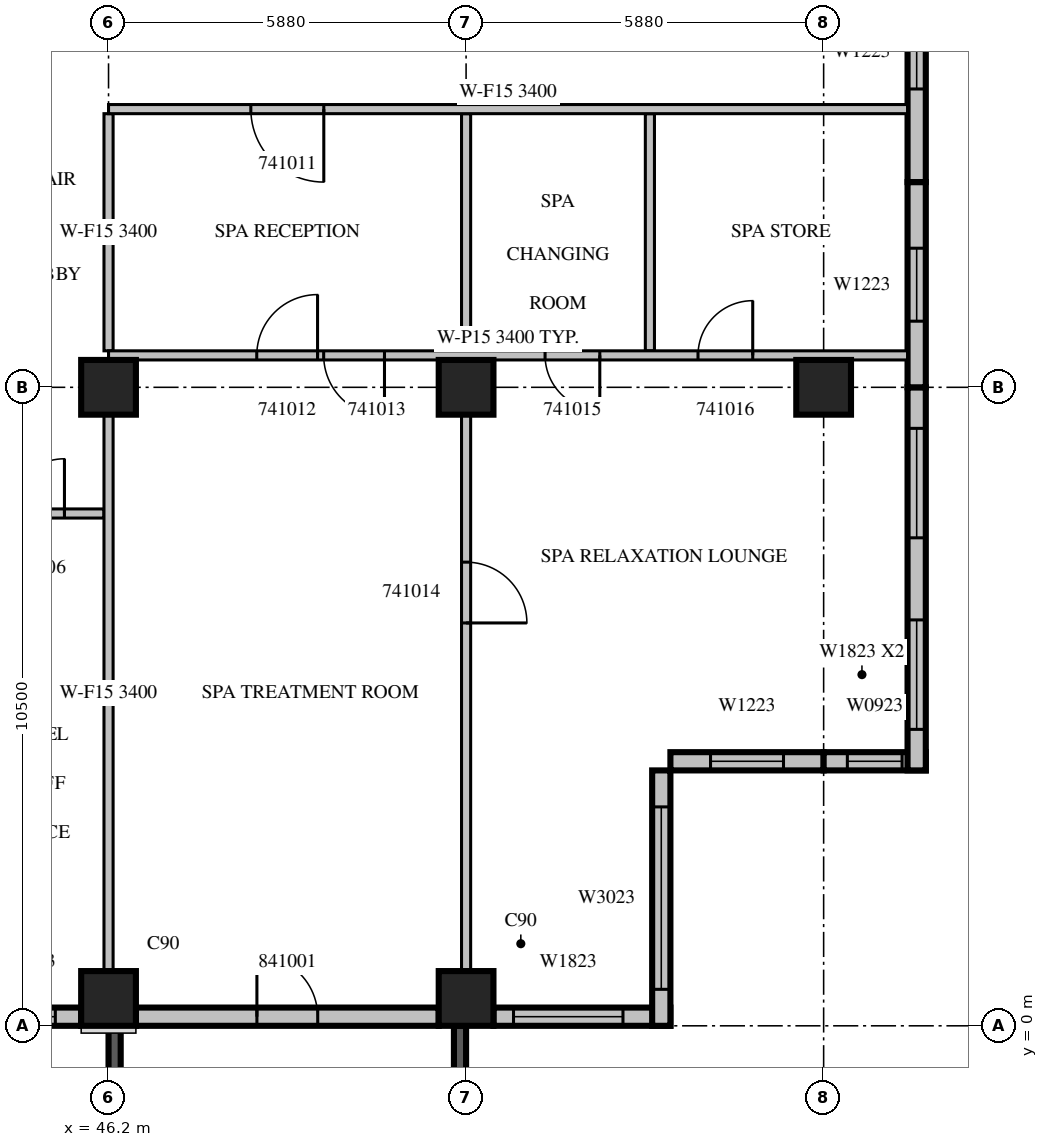
"""IFC4 building model, lengths in metres.
Left out: names, types, materials, properties, quantities, classifications, styles, units other than length and angle.
Written with IfcOpenShell. Run it as: python <this file> out.ifc"""

import sys

from ifc_helpers import new_model, si_unit, direction, frame, frame_2d, origin, origin_2d, place, context, subcontext, project, spatial, rectangle, extrude, source, transform, mapped, element, fill, save


model = new_model("IFC4")
c1 = context("Model", 3, precision=1e-05, world=origin(), true_north=direction((0.0, 1.0)))
c2 = subcontext(c1, "Body", "Model", "MODEL_VIEW")
j1 = project(units=[si_unit("LENGTHUNIT", "METRE"), si_unit("PLANEANGLEUNIT", "RADIAN")], contexts=[c1])
p1 = place(None, origin())
s1 = spatial("IfcSite", under=j1, at=p1, CompositionType="ELEMENT")
p2 = place(p1, origin())
s2 = spatial("IfcBuilding", under=s1, at=p2, CompositionType="ELEMENT")
p3 = place(p2, frame((0.0, 0.0, 189.2)))
s3 = spatial("IfcBuildingStorey", under=s2, at=p3, CompositionType="ELEMENT", Elevation=189.2)
m1 = source(origin(), c2, "Body", "SweptSolid", [
    extrude(rectangle(XDim=0.9, YDim=0.9, at=origin_2d()), origin(), (0.0, 0.0, 1.0), 3.8),
])
for number, where, z_axis, x_axis in (
    (1, (46.2, 0.45, 0.0), (0.0, 0.0, 1.0), (1.0, 0.0, 0.0)),
    (2, (52.08, 0.45, 0.0), (0.0, 0.0, 1.0), (1.0, 0.0, 0.0)),
    (3, (46.2, 10.5, 0.0), (0.0, 0.0, 1.0), (1.0, 0.0, 0.0)),
    (4, (52.08, 10.5, 0.0), (0.0, 0.0, 1.0), (1.0, 0.0, 0.0)),
    (5, (57.96, 10.5, 0.0), (0.0, 0.0, 1.0), (1.0, 0.0, 0.0)),
):
    element("IfcColumn", number, at=place(p3, frame(where, z_axis=z_axis, x_axis=x_axis)), inside=s3, PredefinedType="COLUMN", context=c2, shape_type="MappedRepresentation", body=[
        mapped(m1, transform((0.0, 0.0, 0.0), scale=1.0)),
    ])
m2 = source(origin(), c2, "Body", "SweptSolid", [
    extrude(rectangle(XDim=1.75, YDim=0.3, at=frame_2d((0.875, 0.0))), origin(), (0.0, 0.0, 1.0), 3.4),
])
p4 = place(p3, frame((44.0, 0.15, 0.0), z_axis=(0.0, 0.0, 1.0), x_axis=(1.0, 0.0, 0.0)))
e6 = element("IfcWall", 6, at=p4, inside=s3, PredefinedType="STANDARD", context=c2, shape_type="MappedRepresentation", body=[
    mapped(m2, transform((0.0, 0.0, 0.0), scale=1.0)),
])
m3 = source(origin(), c2, "Body", "SweptSolid", [
    extrude(rectangle(XDim=0.9, YDim=2.3, at=frame_2d((0.45, 1.15))), frame((0.0, 0.16, 0.0), z_axis=(0.0, -1.0, 0.0), x_axis=(1.0, 0.0, 0.0)), (0.0, 0.0, 1.0), 0.32),
])
p5 = place(p4, frame((0.425, 0.0, 0.6)))
e7 = element("IfcOpeningElement", 7, at=p5, cuts=e6, PredefinedType="OPENING", context=c2, shape_type="MappedRepresentation", body=[
    mapped(m3, transform((0.0, 0.0, 0.0), scale=1.0)),
])
m4 = source(origin(), c2, "Body", "SweptSolid", [
    extrude(rectangle(XDim=4.98, YDim=0.3, at=frame_2d((2.49, 0.0))), origin(), (0.0, 0.0, 1.0), 3.4),
])
p6 = place(p3, frame((46.65, 0.15, 0.0), z_axis=(0.0, 0.0, 1.0), x_axis=(1.0, 0.0, 0.0)))
e8 = element("IfcWall", 8, at=p6, inside=s3, PredefinedType="STANDARD", context=c2, shape_type="MappedRepresentation", body=[
    mapped(m4, transform((0.0, 0.0, 0.0), scale=1.0)),
])
m5 = source(origin(), c2, "Body", "SweptSolid", [
    extrude(rectangle(XDim=1.0, YDim=2.1, at=frame_2d((0.5, 1.05))), frame((0.0, 0.16, 0.0), z_axis=(0.0, -1.0, 0.0), x_axis=(1.0, 0.0, 0.0)), (0.0, 0.0, 1.0), 0.32),
])
p7 = place(p6, frame((1.99, 0.0, 0.0)))
e9 = element("IfcOpeningElement", 9, at=p7, cuts=e8, PredefinedType="OPENING", context=c2, shape_type="MappedRepresentation", body=[
    mapped(m5, transform((0.0, 0.0, 0.0), scale=1.0)),
])
m6 = source(origin(), c2, "Body", "SweptSolid", [
    extrude(rectangle(XDim=2.91, YDim=0.3, at=frame_2d((1.455, 0.0))), origin(), (0.0, 0.0, 1.0), 3.4),
])
p8 = place(p3, frame((52.53, 0.15, 0.0), z_axis=(0.0, 0.0, 1.0), x_axis=(1.0, 0.0, 0.0)))
e10 = element("IfcWall", 10, at=p8, inside=s3, PredefinedType="STANDARD", context=c2, shape_type="MappedRepresentation", body=[
    mapped(m6, transform((0.0, 0.0, 0.0), scale=1.0)),
])
m7 = source(origin(), c2, "Body", "SweptSolid", [
    extrude(rectangle(XDim=1.8, YDim=2.3, at=frame_2d((0.9, 1.15))), frame((0.0, 0.16, 0.0), z_axis=(0.0, -1.0, 0.0), x_axis=(1.0, 0.0, 0.0)), (0.0, 0.0, 1.0), 0.32),
])
p9 = place(p8, frame((0.33, 0.0, 0.6)))
e11 = element("IfcOpeningElement", 11, at=p9, cuts=e10, PredefinedType="OPENING", context=c2, shape_type="MappedRepresentation", body=[
    mapped(m7, transform((0.0, 0.0, 0.0), scale=1.0)),
])
m8 = source(origin(), c2, "Body", "SweptSolid", [
    extrude(rectangle(XDim=4.2, YDim=0.3, at=frame_2d((2.1, 0.0))), origin(), (0.0, 0.0, 1.0), 3.4),
])
p10 = place(p3, frame((55.29, 0.0, 0.0), z_axis=(0.0, 0.0, 1.0), x_axis=(0.0, 1.0, 0.0)))
e12 = element("IfcWall", 12, at=p10, inside=s3, PredefinedType="STANDARD", context=c2, shape_type="MappedRepresentation", body=[
    mapped(m8, transform((0.0, 0.0, 0.0), scale=1.0)),
])
m9 = source(origin(), c2, "Body", "SweptSolid", [
    extrude(rectangle(XDim=3.0, YDim=2.3, at=frame_2d((1.5, 1.15))), frame((0.0, 0.16, 0.0), z_axis=(0.0, -1.0, 0.0), x_axis=(1.0, 0.0, 0.0)), (0.0, 0.0, 1.0), 0.32),
])
p11 = place(p10, frame((0.6, 0.0, 0.6)))
e13 = element("IfcOpeningElement", 13, at=p11, cuts=e12, PredefinedType="OPENING", context=c2, shape_type="MappedRepresentation", body=[
    mapped(m9, transform((0.0, 0.0, 0.0), scale=1.0)),
])
m10 = source(origin(), c2, "Body", "SweptSolid", [
    extrude(rectangle(XDim=2.52, YDim=0.3, at=frame_2d((1.26, 0.0))), origin(), (0.0, 0.0, 1.0), 3.4),
])
p12 = place(p3, frame((55.44, 4.35, 0.0), z_axis=(0.0, 0.0, 1.0), x_axis=(1.0, 0.0, 0.0)))
e14 = element("IfcWall", 14, at=p12, inside=s3, PredefinedType="STANDARD", context=c2, shape_type="MappedRepresentation", body=[
    mapped(m10, transform((0.0, 0.0, 0.0), scale=1.0)),
])
m11 = source(origin(), c2, "Body", "SweptSolid", [
    extrude(rectangle(XDim=1.2, YDim=2.3, at=frame_2d((0.6, 1.15))), frame((0.0, 0.16, 0.0), z_axis=(0.0, -1.0, 0.0), x_axis=(1.0, 0.0, 0.0)), (0.0, 0.0, 1.0), 0.32),
])
p13 = place(p12, frame((0.66, 0.0, 0.6)))
e15 = element("IfcOpeningElement", 15, at=p13, cuts=e14, PredefinedType="OPENING", context=c2, shape_type="MappedRepresentation", body=[
    mapped(m11, transform((0.0, 0.0, 0.0), scale=1.0)),
])
m12 = source(origin(), c2, "Body", "SweptSolid", [
    extrude(rectangle(XDim=1.68, YDim=0.3, at=frame_2d((0.84, 0.0))), origin(), (0.0, 0.0, 1.0), 3.4),
])
p14 = place(p3, frame((57.96, 4.35, 0.0), z_axis=(0.0, 0.0, 1.0), x_axis=(1.0, 0.0, 0.0)))
e16 = element("IfcWall", 16, at=p14, inside=s3, PredefinedType="STANDARD", context=c2, shape_type="MappedRepresentation", body=[
    mapped(m12, transform((0.0, 0.0, 0.0), scale=1.0)),
])
p15 = place(p14, frame((0.39, 0.0, 0.6)))
e17 = element("IfcOpeningElement", 17, at=p15, cuts=e16, PredefinedType="OPENING", context=c2, shape_type="MappedRepresentation", body=[
    mapped(m3, transform((0.0, 0.0, 0.0), scale=1.0)),
])
m13 = source(origin(), c2, "Body", "SweptSolid", [
    extrude(rectangle(XDim=6.3, YDim=0.3, at=frame_2d((3.15, 0.0))), origin(), (0.0, 0.0, 1.0), 3.4),
])
p16 = place(p3, frame((59.49, 4.2, 0.0), z_axis=(0.0, 0.0, 1.0), x_axis=(0.0, 1.0, 0.0)))
e18 = element("IfcWall", 18, at=p16, inside=s3, PredefinedType="STANDARD", context=c2, shape_type="MappedRepresentation", body=[
    mapped(m13, transform((0.0, 0.0, 0.0), scale=1.0)),
])
p17 = place(p16, frame((0.675, 0.0, 0.6)))
e19 = element("IfcOpeningElement", 19, at=p17, cuts=e18, PredefinedType="OPENING", context=c2, shape_type="MappedRepresentation", body=[
    mapped(m7, transform((0.0, 0.0, 0.0), scale=1.0)),
])
p18 = place(p16, frame((3.825, 0.0, 0.6)))
e20 = element("IfcOpeningElement", 20, at=p18, cuts=e18, PredefinedType="OPENING", context=c2, shape_type="MappedRepresentation", body=[
    mapped(m7, transform((0.0, 0.0, 0.0), scale=1.0)),
])
m14 = source(origin(), c2, "Body", "SweptSolid", [
    extrude(rectangle(XDim=3.375, YDim=0.3, at=frame_2d((1.688, 0.0))), origin(), (0.0, 0.0, 1.0), 3.4),
])
p19 = place(p3, frame((59.49, 10.5, 0.0), z_axis=(0.0, 0.0, 1.0), x_axis=(0.0, 1.0, 0.0)))
e21 = element("IfcWall", 21, at=p19, inside=s3, PredefinedType="STANDARD", context=c2, shape_type="MappedRepresentation", body=[
    mapped(m14, transform((0.0, 0.0, 0.0), scale=1.0)),
])
p20 = place(p19, frame((1.087, 0.0, 0.6)))
e22 = element("IfcOpeningElement", 22, at=p20, cuts=e21, PredefinedType="OPENING", context=c2, shape_type="MappedRepresentation", body=[
    mapped(m11, transform((0.0, 0.0, 0.0), scale=1.0)),
])
p21 = place(p3, frame((59.49, 13.875, 0.0), z_axis=(0.0, 0.0, 1.0), x_axis=(0.0, 1.0, 0.0)))
e23 = element("IfcWall", 23, at=p21, inside=s3, PredefinedType="STANDARD", context=c2, shape_type="MappedRepresentation", body=[
    mapped(m14, transform((0.0, 0.0, 0.0), scale=1.0)),
])
p22 = place(p21, frame((1.531, 0.0, 0.6)))
e24 = element("IfcOpeningElement", 24, at=p22, cuts=e23, PredefinedType="OPENING", context=c2, shape_type="MappedRepresentation", body=[
    mapped(m11, transform((0.0, 0.0, 0.0), scale=1.0)),
])
m15 = source(origin(), c2, "Body", "SweptSolid", [
    extrude(rectangle(XDim=3.9, YDim=0.2, at=frame_2d((1.95, 0.0))), origin(), (0.0, 0.0, 1.0), 3.39),
])
p23 = place(p3, frame((46.3, 0.0, 0.0), z_axis=(0.0, 0.0, 1.0), x_axis=(0.0, -1.0, 0.0)))
e25 = element("IfcWall", 25, at=p23, inside=s3, PredefinedType="SOLIDWALL", context=c2, shape_type="MappedRepresentation", body=[
    mapped(m15, transform((0.0, 0.0, 0.0), scale=1.0)),
])
m16 = source(origin(), c2, "Body", "SweptSolid", [
    extrude(rectangle(XDim=2.4, YDim=2.3, at=frame_2d((1.2, 1.15))), frame((0.0, 0.11, 0.0), z_axis=(0.0, -1.0, 0.0), x_axis=(1.0, 0.0, 0.0)), (0.0, 0.0, 1.0), 0.22),
])
p24 = place(p23, frame((0.75, 0.0, 0.6)))
e26 = element("IfcOpeningElement", 26, at=p24, cuts=e25, PredefinedType="OPENING", context=c2, shape_type="MappedRepresentation", body=[
    mapped(m16, transform((0.0, 0.0, 0.0), scale=1.0)),
])
p25 = place(p3, frame((51.98, 0.0, 0.0), z_axis=(0.0, 0.0, 1.0), x_axis=(0.0, -1.0, 0.0)))
e27 = element("IfcWall", 27, at=p25, inside=s3, PredefinedType="SOLIDWALL", context=c2, shape_type="MappedRepresentation", body=[
    mapped(m15, transform((0.0, 0.0, 0.0), scale=1.0)),
])
p26 = place(p25, frame((0.75, 0.0, 0.6)))
e28 = element("IfcOpeningElement", 28, at=p26, cuts=e27, PredefinedType="OPENING", context=c2, shape_type="MappedRepresentation", body=[
    mapped(m16, transform((0.0, 0.0, 0.0), scale=1.0)),
])
m17 = source(origin(), c2, "Body", "SweptSolid", [
    extrude(rectangle(XDim=2.2, YDim=0.15, at=frame_2d((1.1, 0.0))), origin(), (0.0, 0.0, 1.0), 3.4),
])
p27 = place(p3, frame((46.125, 8.425, 0.0), z_axis=(0.0, 0.0, 1.0), x_axis=(-1.0, 0.0, 0.0)))
e29 = element("IfcWall", 29, at=p27, inside=s3, PredefinedType="PARTITIONING", context=c2, shape_type="MappedRepresentation", body=[
    mapped(m17, transform((0.0, 0.0, 0.0), scale=1.0)),
])
m18 = source(origin(), c2, "Body", "SweptSolid", [
    extrude(rectangle(XDim=0.9, YDim=2.1, at=frame_2d((0.45, 1.05))), frame((0.0, 0.085, 0.0), z_axis=(0.0, -1.0, 0.0), x_axis=(1.0, 0.0, 0.0)), (0.0, 0.0, 1.0), 0.17),
])
p28 = place(p27, frame((0.65, 0.0, 0.0)))
e30 = element("IfcOpeningElement", 30, at=p28, cuts=e29, PredefinedType="OPENING", context=c2, shape_type="MappedRepresentation", body=[
    mapped(m18, transform((0.0, 0.0, 0.0), scale=1.0)),
])
m19 = source(origin(), c2, "Body", "SweptSolid", [
    extrude(rectangle(XDim=9.152, YDim=0.15, at=frame_2d((4.576, 0.0))), origin(), (0.0, 0.0, 1.0), 3.4),
])
p29 = place(p3, frame((52.08, 0.899, 0.0), z_axis=(0.0, 0.0, 1.0), x_axis=(0.0, 1.0, 0.0)))
e31 = element("IfcWall", 31, at=p29, inside=s3, PredefinedType="PARTITIONING", context=c2, shape_type="MappedRepresentation", body=[
    mapped(m19, transform((0.0, 0.0, 0.0), scale=1.0)),
])
m20 = source(origin(), c2, "Body", "SweptSolid", [
    extrude(rectangle(XDim=1.0, YDim=2.1, at=frame_2d((0.5, 1.05))), frame((0.0, 0.085, 0.0), z_axis=(0.0, -1.0, 0.0), x_axis=(1.0, 0.0, 0.0)), (0.0, 0.0, 1.0), 0.17),
])
p30 = place(p29, frame((5.726, 0.0, 0.0)))
e32 = element("IfcOpeningElement", 32, at=p30, cuts=e31, PredefinedType="OPENING", context=c2, shape_type="MappedRepresentation", body=[
    mapped(m20, transform((0.0, 0.0, 0.0), scale=1.0)),
])
m21 = source(origin(), c2, "Body", "SweptSolid", [
    extrude(rectangle(XDim=3.9, YDim=0.15, at=frame_2d((1.95, 0.0))), origin(), (0.0, 0.0, 1.0), 3.4),
])
for number, where, z_axis, x_axis in (
    (33, (52.08, 11.1, 0.0), (0.0, 0.0, 1.0), (0.0, 1.0, 0.0)),
    (34, (55.103, 11.1, 0.0), (0.0, 0.0, 1.0), (0.0, 1.0, 0.0)),
):
    element("IfcWall", number, at=place(p3, frame(where, z_axis=z_axis, x_axis=x_axis)), inside=s3, PredefinedType="PARTITIONING", context=c2, shape_type="MappedRepresentation", body=[
        mapped(m21, transform((0.0, 0.0, 0.0), scale=1.0)),
    ])
p31 = place(p3, frame((46.2, 0.899, 0.0), z_axis=(0.0, 0.0, 1.0), x_axis=(0.0, 1.0, 0.0)))
e35 = element("IfcWall", 35, at=p31, inside=s3, PredefinedType="PARTITIONING", context=c2, shape_type="MappedRepresentation", body=[
    mapped(m19, transform((0.0, 0.0, 0.0), scale=1.0)),
])
p32 = place(p3, frame((46.2, 11.1, 0.0), z_axis=(0.0, 0.0, 1.0), x_axis=(0.0, 1.0, 0.0)))
e36 = element("IfcWall", 36, at=p32, inside=s3, PredefinedType="PARTITIONING", context=c2, shape_type="MappedRepresentation", body=[
    mapped(m21, transform((0.0, 0.0, 0.0), scale=1.0)),
])
m22 = source(origin(), c2, "Body", "SweptSolid", [
    extrude(rectangle(XDim=13.14, YDim=0.15, at=frame_2d((6.57, 0.0))), origin(), (0.0, 0.0, 1.0), 3.4),
])
p33 = place(p3, frame((59.34, 11.025, 0.0), z_axis=(0.0, 0.0, 1.0), x_axis=(-1.0, 0.0, 0.0)))
e37 = element("IfcWall", 37, at=p33, inside=s3, PredefinedType="PARTITIONING", context=c2, shape_type="MappedRepresentation", body=[
    mapped(m22, transform((0.0, 0.0, 0.0), scale=1.0)),
])
p34 = place(p33, frame((9.703, 0.0, 0.0)))
e38 = element("IfcOpeningElement", 38, at=p34, cuts=e37, PredefinedType="OPENING", context=c2, shape_type="MappedRepresentation", body=[
    mapped(m20, transform((0.0, 0.0, 0.0), scale=1.0)),
])
p35 = place(p33, frame((8.602, 0.0, 0.0)))
e39 = element("IfcOpeningElement", 39, at=p35, cuts=e37, PredefinedType="OPENING", context=c2, shape_type="MappedRepresentation", body=[
    mapped(m20, transform((0.0, 0.0, 0.0), scale=1.0)),
])
p36 = place(p33, frame((5.061, 0.0, 0.0)))
e40 = element("IfcOpeningElement", 40, at=p36, cuts=e37, PredefinedType="OPENING", context=c2, shape_type="MappedRepresentation", body=[
    mapped(m18, transform((0.0, 0.0, 0.0), scale=1.0)),
])
p37 = place(p33, frame((2.546, 0.0, 0.0)))
e41 = element("IfcOpeningElement", 41, at=p37, cuts=e37, PredefinedType="OPENING", context=c2, shape_type="MappedRepresentation", body=[
    mapped(m18, transform((0.0, 0.0, 0.0), scale=1.0)),
])
p38 = place(p3, frame((59.34, 15.075, 0.0), z_axis=(0.0, 0.0, 1.0), x_axis=(-1.0, 0.0, 0.0)))
e42 = element("IfcWall", 42, at=p38, inside=s3, PredefinedType="PARTITIONING", context=c2, shape_type="MappedRepresentation", body=[
    mapped(m22, transform((0.0, 0.0, 0.0), scale=1.0)),
])
m23 = source(origin(), c2, "Body", "SweptSolid", [
    extrude(rectangle(XDim=1.2, YDim=2.1, at=frame_2d((0.6, 1.05))), frame((0.0, 0.085, 0.0), z_axis=(0.0, -1.0, 0.0), x_axis=(1.0, 0.0, 0.0)), (0.0, 0.0, 1.0), 0.17),
])
p39 = place(p38, frame((9.6, 0.0, 0.0)))
e43 = element("IfcOpeningElement", 43, at=p39, cuts=e42, PredefinedType="OPENING", context=c2, shape_type="MappedRepresentation", body=[
    mapped(m23, transform((0.0, 0.0, 0.0), scale=1.0)),
])
m24 = source(origin(), c2, "Body", "SweptSolid", [
    extrude(rectangle(XDim=0.9, YDim=2.3, at=frame_2d((0.45, 1.15))), frame((0.0, 0.03, 0.0), z_axis=(0.0, -1.0, 0.0), x_axis=(1.0, 0.0, 0.0)), (0.0, 0.0, 1.0), 0.06),
])
p40 = place(p5, origin())
e44 = element("IfcWindow", 44, at=p40, inside=s3, PartitioningType="SINGLE_PANEL", PredefinedType="WINDOW", context=c2, shape_type="MappedRepresentation", body=[
    mapped(m24, transform((0.0, 0.0, 0.0), scale=1.0)),
])
fill(e7, e44)
m25 = source(origin(), c2, "Body", "SweptSolid", [
    extrude(rectangle(XDim=1.8, YDim=2.3, at=frame_2d((0.9, 1.15))), frame((0.0, 0.03, 0.0), z_axis=(0.0, -1.0, 0.0), x_axis=(1.0, 0.0, 0.0)), (0.0, 0.0, 1.0), 0.06),
])
p41 = place(p9, origin())
e45 = element("IfcWindow", 45, at=p41, inside=s3, PartitioningType="SINGLE_PANEL", PredefinedType="WINDOW", context=c2, shape_type="MappedRepresentation", body=[
    mapped(m25, transform((0.0, 0.0, 0.0), scale=1.0)),
])
fill(e11, e45)
m26 = source(origin(), c2, "Body", "SweptSolid", [
    extrude(rectangle(XDim=3.0, YDim=2.3, at=frame_2d((1.5, 1.15))), frame((0.0, 0.03, 0.0), z_axis=(0.0, -1.0, 0.0), x_axis=(1.0, 0.0, 0.0)), (0.0, 0.0, 1.0), 0.06),
])
p42 = place(p11, origin())
e46 = element("IfcWindow", 46, at=p42, inside=s3, PartitioningType="SINGLE_PANEL", PredefinedType="WINDOW", context=c2, shape_type="MappedRepresentation", body=[
    mapped(m26, transform((0.0, 0.0, 0.0), scale=1.0)),
])
fill(e13, e46)
m27 = source(origin(), c2, "Body", "SweptSolid", [
    extrude(rectangle(XDim=1.2, YDim=2.3, at=frame_2d((0.6, 1.15))), frame((0.0, 0.03, 0.0), z_axis=(0.0, -1.0, 0.0), x_axis=(1.0, 0.0, 0.0)), (0.0, 0.0, 1.0), 0.06),
])
p43 = place(p13, origin())
e47 = element("IfcWindow", 47, at=p43, inside=s3, PartitioningType="SINGLE_PANEL", PredefinedType="WINDOW", context=c2, shape_type="MappedRepresentation", body=[
    mapped(m27, transform((0.0, 0.0, 0.0), scale=1.0)),
])
fill(e15, e47)
p44 = place(p15, origin())
e48 = element("IfcWindow", 48, at=p44, inside=s3, PartitioningType="SINGLE_PANEL", PredefinedType="WINDOW", context=c2, shape_type="MappedRepresentation", body=[
    mapped(m24, transform((0.0, 0.0, 0.0), scale=1.0)),
])
fill(e17, e48)
p45 = place(p17, origin())
e49 = element("IfcWindow", 49, at=p45, inside=s3, PartitioningType="SINGLE_PANEL", PredefinedType="WINDOW", context=c2, shape_type="MappedRepresentation", body=[
    mapped(m25, transform((0.0, 0.0, 0.0), scale=1.0)),
])
fill(e19, e49)
p46 = place(p18, origin())
e50 = element("IfcWindow", 50, at=p46, inside=s3, PartitioningType="SINGLE_PANEL", PredefinedType="WINDOW", context=c2, shape_type="MappedRepresentation", body=[
    mapped(m25, transform((0.0, 0.0, 0.0), scale=1.0)),
])
fill(e20, e50)
p47 = place(p20, origin())
e51 = element("IfcWindow", 51, at=p47, inside=s3, PartitioningType="SINGLE_PANEL", PredefinedType="WINDOW", context=c2, shape_type="MappedRepresentation", body=[
    mapped(m27, transform((0.0, 0.0, 0.0), scale=1.0)),
])
fill(e22, e51)
p48 = place(p22, origin())
e52 = element("IfcWindow", 52, at=p48, inside=s3, PartitioningType="SINGLE_PANEL", PredefinedType="WINDOW", context=c2, shape_type="MappedRepresentation", body=[
    mapped(m27, transform((0.0, 0.0, 0.0), scale=1.0)),
])
fill(e24, e52)
m28 = source(origin(), c2, "Body", "SweptSolid", [
    extrude(rectangle(XDim=0.9, YDim=2.1, at=frame_2d((0.45, 1.05))), frame((0.0, 0.025, 0.0), z_axis=(0.0, -1.0, 0.0), x_axis=(1.0, 0.0, 0.0)), (0.0, 0.0, 1.0), 0.05),
])
p49 = place(p28, origin())
e53 = element("IfcDoor", 53, at=p49, inside=s3, OperationType="SINGLE_SWING_RIGHT", PredefinedType="DOOR", context=c2, shape_type="MappedRepresentation", body=[
    mapped(m28, transform((0.0, 0.0, 0.0), scale=1.0)),
])
fill(e30, e53)
m29 = source(origin(), c2, "Body", "SweptSolid", [
    extrude(rectangle(XDim=1.2, YDim=2.1, at=frame_2d((0.6, 1.05))), frame((0.0, 0.025, 0.0), z_axis=(0.0, -1.0, 0.0), x_axis=(1.0, 0.0, 0.0)), (0.0, 0.0, 1.0), 0.05),
])
p50 = place(p39, origin())
e54 = element("IfcDoor", 54, at=p50, inside=s3, OperationType="SINGLE_SWING_LEFT", PredefinedType="DOOR", context=c2, shape_type="MappedRepresentation", body=[
    mapped(m29, transform((0.0, 0.0, 0.0), scale=1.0)),
])
fill(e43, e54)
m30 = source(origin(), c2, "Body", "SweptSolid", [
    extrude(rectangle(XDim=1.0, YDim=2.1, at=frame_2d((0.5, 1.05))), frame((0.0, 0.025, 0.0), z_axis=(0.0, -1.0, 0.0), x_axis=(1.0, 0.0, 0.0)), (0.0, 0.0, 1.0), 0.05),
])
p51 = place(p34, origin())
e55 = element("IfcDoor", 55, at=p51, inside=s3, OperationType="SINGLE_SWING_RIGHT", PredefinedType="DOOR", context=c2, shape_type="MappedRepresentation", body=[
    mapped(m30, transform((0.0, 0.0, 0.0), scale=1.0)),
])
fill(e38, e55)
p52 = place(p35, origin())
e56 = element("IfcDoor", 56, at=p52, inside=s3, OperationType="SINGLE_SWING_LEFT", PredefinedType="DOOR", context=c2, shape_type="MappedRepresentation", body=[
    mapped(m30, transform((0.0, 0.0, 0.0), scale=1.0)),
])
fill(e39, e56)
p53 = place(p30, origin())
e57 = element("IfcDoor", 57, at=p53, inside=s3, OperationType="SINGLE_SWING_RIGHT", PredefinedType="DOOR", context=c2, shape_type="MappedRepresentation", body=[
    mapped(m30, transform((0.0, 0.0, 0.0), scale=1.0)),
])
fill(e32, e57)
p54 = place(p36, origin())
e58 = element("IfcDoor", 58, at=p54, inside=s3, OperationType="SINGLE_SWING_LEFT", PredefinedType="DOOR", context=c2, shape_type="MappedRepresentation", body=[
    mapped(m28, transform((0.0, 0.0, 0.0), scale=1.0)),
])
fill(e40, e58)
p55 = place(p37, origin())
e59 = element("IfcDoor", 59, at=p55, inside=s3, OperationType="SINGLE_SWING_RIGHT", PredefinedType="DOOR", context=c2, shape_type="MappedRepresentation", body=[
    mapped(m28, transform((0.0, 0.0, 0.0), scale=1.0)),
])
fill(e41, e59)
p56 = place(p7, origin())
e60 = element("IfcDoor", 60, at=p56, inside=s3, OperationType="SINGLE_SWING_LEFT", PredefinedType="DOOR", context=c2, shape_type="MappedRepresentation", body=[
    mapped(m30, transform((0.0, 0.0, 0.0), scale=1.0)),
])
fill(e9, e60)
save(model, sys.argv[1])
